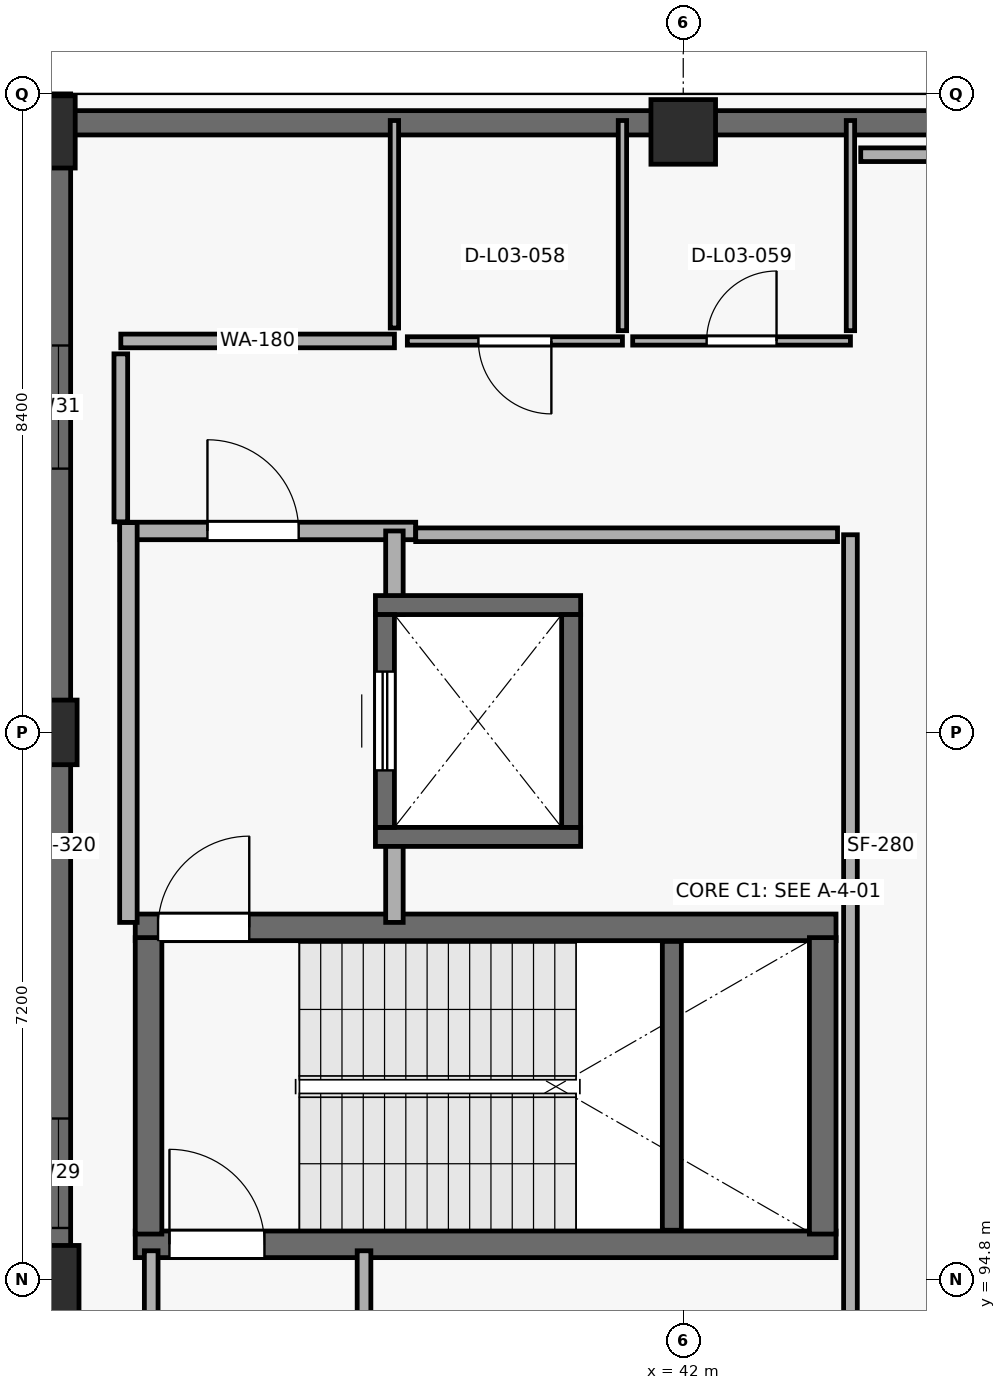
"""IFC4 building model, lengths in metres.
Left out: names, types, materials, properties, quantities, classifications, styles, units other than length and angle.
Written with IfcOpenShell. Run it as: python <this file> out.ifc"""

import sys

from ifc_helpers import new_model, si_unit, direction, frame, frame_2d, origin, origin_2d, place, context, subcontext, project, spatial, rectangle, extrude, element, fill, save


model = new_model("IFC4")
c1 = context("Model", 3, precision=1e-05, world=origin(), true_north=direction((0.0, 1.0)))
c2 = subcontext(c1, "Body", "Model", "MODEL_VIEW")
j1 = project(units=[si_unit("LENGTHUNIT", "METRE"), si_unit("PLANEANGLEUNIT", "RADIAN")], contexts=[c1])
p1 = place(None, origin())
s1 = spatial("IfcSite", under=j1, at=p1, CompositionType="ELEMENT")
p2 = place(p1, origin())
s2 = spatial("IfcBuilding", under=s1, at=p2, CompositionType="ELEMENT")
p3 = place(p2, frame((0.0, 0.0, 10.2)))
s3 = spatial("IfcBuildingStorey", under=s2, at=p3, CompositionType="ELEMENT", Elevation=10.2)
p4 = place(p3, frame((33.6, 94.8, 0.0), z_axis=(0.0, 0.0, 1.0), x_axis=(1.0, 0.0, 0.0)))
e1 = element("IfcColumn", 1, at=p4, inside=s3, PredefinedType="COLUMN", context=c2, shape_type="SweptSolid", body=[
    extrude(rectangle(XDim=0.9, YDim=0.9, at=origin_2d()), origin(), (0.0, 0.0, 1.0), 5.1),
])
p5 = place(p3, frame((33.6, 102.0, 0.0), z_axis=(0.0, 0.0, 1.0), x_axis=(1.0, 0.0, 0.0)))
e2 = element("IfcColumn", 2, at=p5, inside=s3, PredefinedType="COLUMN", context=c2, shape_type="SweptSolid", body=[
    extrude(rectangle(XDim=0.85, YDim=0.85, at=origin_2d()), origin(), (0.0, 0.0, 1.0), 5.1),
])
p6 = place(p3, frame((33.6, 109.9, 0.0), z_axis=(0.0, 0.0, 1.0), x_axis=(1.0, 0.0, 0.0)))
e3 = element("IfcColumn", 3, at=p6, inside=s3, PredefinedType="COLUMN", context=c2, shape_type="SweptSolid", body=[
    extrude(rectangle(XDim=0.8, YDim=0.95, at=origin_2d()), origin(), (0.0, 0.0, 1.0), 5.1),
])
p7 = place(p3, frame((42.0, 109.9, 0.0), z_axis=(0.0, 0.0, 1.0), x_axis=(1.0, 0.0, 0.0)))
e4 = element("IfcColumn", 4, at=p7, inside=s3, PredefinedType="COLUMN", context=c2, shape_type="SweptSolid", body=[
    extrude(rectangle(XDim=0.85, YDim=0.85, at=origin_2d()), origin(), (0.0, 0.0, 1.0), 5.1),
])
p8 = place(p3, frame((33.78, 90.6, 0.0), z_axis=(0.0, 0.0, 1.0), x_axis=(0.0, 1.0, 0.0)))
e5 = element("IfcWall", 5, at=p8, inside=s3, PredefinedType="SOLIDWALL", context=c2, shape_type="SweptSolid", body=[
    extrude(rectangle(XDim=19.8, YDim=0.32, at=frame_2d((9.9, 0.0))), origin(), (0.0, 0.0, 1.0), 4.82),
])
p9 = place(p8, frame((4.88, 0.0, 0.75)))
e6 = element("IfcOpeningElement", 6, at=p9, cuts=e5, PredefinedType="OPENING", context=c2, shape_type="SweptSolid", body=[
    extrude(rectangle(XDim=1.44, YDim=3.05, at=frame_2d((0.72, 1.525))), frame((0.0, 0.17, 0.0), z_axis=(0.0, -1.0, 0.0), x_axis=(1.0, 0.0, 0.0)), (0.0, 0.0, 1.0), 0.34),
])
p10 = place(p8, frame((14.87, 0.0, 0.75)))
e7 = element("IfcOpeningElement", 7, at=p10, cuts=e5, PredefinedType="OPENING", context=c2, shape_type="SweptSolid", body=[
    extrude(rectangle(XDim=1.62, YDim=1.85, at=frame_2d((0.81, 0.925))), frame((0.0, 0.17, 0.0), z_axis=(0.0, -1.0, 0.0), x_axis=(1.0, 0.0, 0.0)), (0.0, 0.0, 1.0), 0.34),
])
p11 = place(p3, frame((33.6, 110.02, 0.0), z_axis=(0.0, 0.0, 1.0), x_axis=(1.0, 0.0, 0.0)))
e8 = element("IfcWall", 8, at=p11, inside=s3, PredefinedType="SOLIDWALL", context=c2, shape_type="SweptSolid", body=[
    extrude(rectangle(XDim=33.6, YDim=0.32, at=frame_2d((16.8, 0.0))), origin(), (0.0, 0.0, 1.0), 4.82),
])
p12 = place(p3, frame((34.79, 95.265, 0.0), z_axis=(0.0, 0.0, 1.0), x_axis=(1.0, 0.0, 0.0)))
e9 = element("IfcWall", 9, at=p12, inside=s3, PredefinedType="SHEAR", context=c2, shape_type="SweptSolid", body=[
    extrude(rectangle(XDim=9.22, YDim=0.35, at=frame_2d((4.61, 0.0))), origin(), (0.0, 0.0, 1.0), 4.82),
])
p13 = place(p12, frame((0.45, 0.0, 0.0)))
e10 = element("IfcOpeningElement", 10, at=p13, cuts=e9, PredefinedType="OPENING", context=c2, shape_type="SweptSolid", body=[
    extrude(rectangle(XDim=1.25, YDim=2.2, at=frame_2d((0.625, 1.1))), frame((0.0, 0.185, 0.0), z_axis=(0.0, -1.0, 0.0), x_axis=(1.0, 0.0, 0.0)), (0.0, 0.0, 1.0), 0.37),
])
p14 = place(p3, frame((44.01, 99.435, 0.0), z_axis=(0.0, 0.0, 1.0), x_axis=(-1.0, 0.0, 0.0)))
e11 = element("IfcWall", 11, at=p14, inside=s3, PredefinedType="SHEAR", context=c2, shape_type="SweptSolid", body=[
    extrude(rectangle(XDim=9.22, YDim=0.35, at=frame_2d((4.61, 0.0))), origin(), (0.0, 0.0, 1.0), 4.82),
])
p15 = place(p14, frame((7.72, 0.0, 0.0)))
e12 = element("IfcOpeningElement", 12, at=p15, cuts=e11, PredefinedType="OPENING", context=c2, shape_type="SweptSolid", body=[
    extrude(rectangle(XDim=1.2, YDim=2.2, at=frame_2d((0.6, 1.1))), frame((0.0, 0.185, 0.0), z_axis=(0.0, -1.0, 0.0), x_axis=(1.0, 0.0, 0.0)), (0.0, 0.0, 1.0), 0.37),
])
for number, where, z_axis, x_axis in (
    (13, (34.965, 95.4, 0.0), (0.0, 0.0, 1.0), (0.0, 1.0, 0.0)),
    (14, (43.835, 99.3, 0.0), (0.0, 0.0, 1.0), (0.0, -1.0, 0.0)),
):
    element("IfcWall", number, at=place(p3, frame(where, z_axis=z_axis, x_axis=x_axis)), inside=s3, PredefinedType="SHEAR", context=c2, shape_type="SweptSolid", body=[
        extrude(rectangle(XDim=3.9, YDim=0.35, at=frame_2d((1.95, 0.0))), origin(), (0.0, 0.0, 1.0), 4.82),
    ])
p16 = place(p3, frame((41.85, 95.45, 0.0), z_axis=(0.0, 0.0, 1.0), x_axis=(0.0, 1.0, 0.0)))
e15 = element("IfcWall", 15, at=p16, inside=s3, PredefinedType="SHEAR", context=c2, shape_type="SweptSolid", body=[
    extrude(rectangle(XDim=3.8, YDim=0.25, at=frame_2d((1.9, 0.0))), origin(), (0.0, 0.0, 1.0), 2.37),
])
p17 = place(p3, frame((34.59, 104.65, 0.0), z_axis=(0.0, 0.0, 1.0), x_axis=(1.0, 0.0, 0.0)))
e16 = element("IfcWall", 16, at=p17, inside=s3, PredefinedType="PARTITIONING", context=c2, shape_type="SweptSolid", body=[
    extrude(rectangle(XDim=3.89, YDim=0.23, at=frame_2d((1.945, 0.0))), origin(), (0.0, 0.0, 1.0), 4.82),
])
p18 = place(p17, frame((1.15, 0.0, 0.0)))
e17 = element("IfcOpeningElement", 17, at=p18, cuts=e16, PredefinedType="OPENING", context=c2, shape_type="SweptSolid", body=[
    extrude(rectangle(XDim=1.2, YDim=2.2, at=frame_2d((0.6, 1.1))), frame((0.0, 0.125, 0.0), z_axis=(0.0, -1.0, 0.0), x_axis=(1.0, 0.0, 0.0)), (0.0, 0.0, 1.0), 0.25),
])
p19 = place(p3, frame((34.7, 99.5, 0.0), z_axis=(0.0, 0.0, 1.0), x_axis=(0.0, 1.0, 0.0)))
e18 = element("IfcWall", 18, at=p19, inside=s3, PredefinedType="PARTITIONING", context=c2, shape_type="SweptSolid", body=[
    extrude(rectangle(XDim=5.26, YDim=0.23, at=frame_2d((2.63, 0.0))), origin(), (0.0, 0.0, 1.0), 4.82),
])
p20 = place(p3, frame((38.2, 104.65, 0.0), z_axis=(0.0, 0.0, 1.0), x_axis=(0.0, -1.0, 0.0)))
e19 = element("IfcWall", 19, at=p20, inside=s3, PredefinedType="PARTITIONING", context=c2, shape_type="SweptSolid", body=[
    extrude(rectangle(XDim=1.1, YDim=0.23, at=frame_2d((0.55, 0.0))), origin(), (0.0, 0.0, 1.0), 4.82),
])
p21 = place(p3, frame((38.2, 100.75, 0.0), z_axis=(0.0, 0.0, 1.0), x_axis=(0.0, -1.0, 0.0)))
e20 = element("IfcWall", 20, at=p21, inside=s3, PredefinedType="PARTITIONING", context=c2, shape_type="SweptSolid", body=[
    extrude(rectangle(XDim=1.25, YDim=0.23, at=frame_2d((0.625, 0.0))), origin(), (0.0, 0.0, 1.0), 4.82),
])
for number, where, z_axis, x_axis in (
    (21, (37.95, 100.625, 0.0), (0.0, 0.0, 1.0), (1.0, 0.0, 0.0)),
    (22, (40.65, 103.675, 0.0), (0.0, 0.0, 1.0), (-1.0, 0.0, 0.0)),
):
    element("IfcWall", number, at=place(p3, frame(where, z_axis=z_axis, x_axis=x_axis)), inside=s3, PredefinedType="SHEAR", context=c2, shape_type="SweptSolid", body=[
        extrude(rectangle(XDim=2.7, YDim=0.25, at=frame_2d((1.35, 0.0))), origin(), (0.0, 0.0, 1.0), 4.82),
    ])
p22 = place(p3, frame((38.075, 100.75, 0.0), z_axis=(0.0, 0.0, 1.0), x_axis=(0.0, 1.0, 0.0)))
e23 = element("IfcWall", 23, at=p22, inside=s3, PredefinedType="SHEAR", context=c2, shape_type="SweptSolid", body=[
    extrude(rectangle(XDim=2.8, YDim=0.25, at=frame_2d((1.4, 0.0))), origin(), (0.0, 0.0, 1.0), 4.82),
])
p23 = place(p22, frame((0.75, 0.0, 0.0)))
e24 = element("IfcOpeningElement", 24, at=p23, cuts=e23, PredefinedType="OPENING", context=c2, shape_type="SweptSolid", body=[
    extrude(rectangle(XDim=1.3, YDim=2.25, at=frame_2d((0.65, 1.125))), frame((0.0, 0.135, 0.0), z_axis=(0.0, -1.0, 0.0), x_axis=(1.0, 0.0, 0.0)), (0.0, 0.0, 1.0), 0.27),
])
p24 = place(p3, frame((40.525, 103.55, 0.0), z_axis=(0.0, 0.0, 1.0), x_axis=(0.0, -1.0, 0.0)))
e25 = element("IfcWall", 25, at=p24, inside=s3, PredefinedType="SHEAR", context=c2, shape_type="SweptSolid", body=[
    extrude(rectangle(XDim=2.8, YDim=0.25, at=frame_2d((1.4, 0.0))), origin(), (0.0, 0.0, 1.0), 4.82),
])
p25 = place(p3, frame((44.2, 104.6, 0.0), z_axis=(0.0, 0.0, 1.0), x_axis=(0.0, -1.0, 0.0)))
e26 = element("IfcWall", 26, at=p25, inside=s3, PredefinedType="PARTITIONING", context=c2, shape_type="SweptSolid", body=[
    extrude(rectangle(XDim=10.75, YDim=0.18, at=frame_2d((5.375, 0.0))), origin(), (0.0, 0.0, 1.0), 4.82),
])
p26 = place(p3, frame((38.48, 104.6, 0.0), z_axis=(0.0, 0.0, 1.0), x_axis=(1.0, 0.0, 0.0)))
e27 = element("IfcWall", 27, at=p26, inside=s3, PredefinedType="PARTITIONING", context=c2, shape_type="SweptSolid", body=[
    extrude(rectangle(XDim=5.55, YDim=0.18, at=frame_2d((2.775, 0.0))), origin(), (0.0, 0.0, 1.0), 4.82),
])
p27 = place(p3, frame((38.2, 107.15, 0.0), z_axis=(0.0, 0.0, 1.0), x_axis=(-1.0, 0.0, 0.0)))
e28 = element("IfcWall", 28, at=p27, inside=s3, PredefinedType="PARTITIONING", context=c2, shape_type="SweptSolid", body=[
    extrude(rectangle(XDim=3.6, YDim=0.18, at=frame_2d((1.8, 0.0))), origin(), (0.0, 0.0, 1.0), 4.82),
])
p28 = place(p3, frame((41.2, 107.15, 0.0), z_axis=(0.0, 0.0, 1.0), x_axis=(-1.0, 0.0, 0.0)))
e29 = element("IfcWall", 29, at=p28, inside=s3, PredefinedType="PARTITIONING", context=c2, shape_type="SweptSolid", body=[
    extrude(rectangle(XDim=2.83, YDim=0.11, at=frame_2d((1.415, 0.0))), origin(), (0.0, 0.0, 1.0), 4.82),
])
p29 = place(p28, frame((0.935, 0.0, 0.0)))
e30 = element("IfcOpeningElement", 30, at=p29, cuts=e29, PredefinedType="OPENING", context=c2, shape_type="SweptSolid", body=[
    extrude(rectangle(XDim=0.96, YDim=2.14, at=frame_2d((0.48, 1.07))), frame((0.0, 0.065, 0.0), z_axis=(0.0, -1.0, 0.0), x_axis=(1.0, 0.0, 0.0)), (0.0, 0.0, 1.0), 0.13),
])
p30 = place(p3, frame((44.2, 107.15, 0.0), z_axis=(0.0, 0.0, 1.0), x_axis=(-1.0, 0.0, 0.0)))
e31 = element("IfcWall", 31, at=p30, inside=s3, PredefinedType="PARTITIONING", context=c2, shape_type="SweptSolid", body=[
    extrude(rectangle(XDim=2.865, YDim=0.11, at=frame_2d((1.433, 0.0))), origin(), (0.0, 0.0, 1.0), 4.82),
])
p31 = place(p30, frame((0.972, 0.0, 0.0)))
e32 = element("IfcOpeningElement", 32, at=p31, cuts=e31, PredefinedType="OPENING", context=c2, shape_type="SweptSolid", body=[
    extrude(rectangle(XDim=0.92, YDim=2.12, at=frame_2d((0.46, 1.06))), frame((0.0, 0.065, 0.0), z_axis=(0.0, -1.0, 0.0), x_axis=(1.0, 0.0, 0.0)), (0.0, 0.0, 1.0), 0.13),
])
p32 = place(p3, frame((41.2, 110.05, 0.0), z_axis=(0.0, 0.0, 1.0), x_axis=(0.0, -1.0, 0.0)))
e33 = element("IfcWall", 33, at=p32, inside=s3, PredefinedType="PARTITIONING", context=c2, shape_type="SweptSolid", body=[
    extrude(rectangle(XDim=2.765, YDim=0.11, at=frame_2d((1.383, 0.0))), origin(), (0.0, 0.0, 1.0), 4.82),
])
p33 = place(p3, frame((38.2, 107.32, 0.0), z_axis=(0.0, 0.0, 1.0), x_axis=(0.0, 1.0, 0.0)))
e34 = element("IfcWall", 34, at=p33, inside=s3, PredefinedType="PARTITIONING", context=c2, shape_type="SweptSolid", body=[
    extrude(rectangle(XDim=2.73, YDim=0.11, at=frame_2d((1.365, 0.0))), origin(), (0.0, 0.0, 1.0), 4.82),
])
p34 = place(p3, frame((44.2, 110.05, 0.0), z_axis=(0.0, 0.0, 1.0), x_axis=(0.0, -1.0, 0.0)))
e35 = element("IfcWall", 35, at=p34, inside=s3, PredefinedType="PARTITIONING", context=c2, shape_type="SweptSolid", body=[
    extrude(rectangle(XDim=2.765, YDim=0.11, at=frame_2d((1.383, 0.0))), origin(), (0.0, 0.0, 1.0), 4.82),
])
p35 = place(p3, frame((34.6, 106.98, 0.0), z_axis=(0.0, 0.0, 1.0), x_axis=(0.0, -1.0, 0.0)))
e36 = element("IfcWall", 36, at=p35, inside=s3, PredefinedType="PARTITIONING", context=c2, shape_type="SweptSolid", body=[
    extrude(rectangle(XDim=2.21, YDim=0.18, at=frame_2d((1.105, 0.0))), origin(), (0.0, 0.0, 1.0), 4.82),
])
p36 = place(p3, frame((46.23, 109.6, 0.0), z_axis=(0.0, 0.0, 1.0), x_axis=(-1.0, 0.0, 0.0)))
e37 = element("IfcWall", 37, at=p36, inside=s3, PredefinedType="PARTITIONING", context=c2, shape_type="SweptSolid", body=[
    extrude(rectangle(XDim=1.895, YDim=0.18, at=frame_2d((0.948, 0.0))), origin(), (0.0, 0.0, 1.0), 3.9),
])
p37 = place(p3, frame((37.8, 94.02, 0.0), z_axis=(0.0, 0.0, 1.0), x_axis=(0.0, 1.0, 0.0)))
e38 = element("IfcWall", 38, at=p37, inside=s3, PredefinedType="PARTITIONING", context=c2, shape_type="SweptSolid", body=[
    extrude(rectangle(XDim=1.16, YDim=0.18, at=frame_2d((0.58, 0.0))), origin(), (0.0, 0.0, 1.0), 4.82),
])
p38 = place(p3, frame((35.0, 95.18, 0.0), z_axis=(0.0, 0.0, 1.0), x_axis=(0.0, -1.0, 0.0)))
e39 = element("IfcWall", 39, at=p38, inside=s3, PredefinedType="PARTITIONING", context=c2, shape_type="SweptSolid", body=[
    extrude(rectangle(XDim=1.33, YDim=0.18, at=frame_2d((0.665, 0.0))), origin(), (0.0, 0.0, 1.0), 4.82),
])
p39 = place(p9, origin())
e40 = element("IfcWindow", 40, at=p39, inside=s3, PartitioningType="SINGLE_PANEL", PredefinedType="WINDOW", context=c2, shape_type="SweptSolid", body=[
    extrude(rectangle(XDim=1.44, YDim=3.05, at=frame_2d((0.72, 1.525))), frame((0.0, 0.03, 0.0), z_axis=(0.0, -1.0, 0.0), x_axis=(1.0, 0.0, 0.0)), (0.0, 0.0, 1.0), 0.06),
])
fill(e6, e40)
p40 = place(p10, origin())
e41 = element("IfcWindow", 41, at=p40, inside=s3, PartitioningType="SINGLE_PANEL", PredefinedType="WINDOW", context=c2, shape_type="SweptSolid", body=[
    extrude(rectangle(XDim=1.62, YDim=1.85, at=frame_2d((0.81, 0.925))), frame((0.0, 0.03, 0.0), z_axis=(0.0, -1.0, 0.0), x_axis=(1.0, 0.0, 0.0)), (0.0, 0.0, 1.0), 0.06),
])
fill(e7, e41)
p41 = place(p13, origin())
e42 = element("IfcDoor", 42, at=p41, inside=s3, OperationType="SINGLE_SWING_LEFT", PredefinedType="DOOR", context=c2, shape_type="SweptSolid", body=[
    extrude(rectangle(XDim=1.25, YDim=2.2, at=frame_2d((0.625, 1.1))), frame((0.0, 0.025, 0.0), z_axis=(0.0, -1.0, 0.0), x_axis=(1.0, 0.0, 0.0)), (0.0, 0.0, 1.0), 0.05),
])
fill(e10, e42)
p42 = place(p15, origin())
e43 = element("IfcDoor", 43, at=p42, inside=s3, OperationType="SINGLE_SWING_RIGHT", PredefinedType="DOOR", context=c2, shape_type="SweptSolid", body=[
    extrude(rectangle(XDim=1.2, YDim=2.2, at=frame_2d((0.6, 1.1))), frame((0.0, 0.025, 0.0), z_axis=(0.0, -1.0, 0.0), x_axis=(1.0, 0.0, 0.0)), (0.0, 0.0, 1.0), 0.05),
])
fill(e12, e43)
p43 = place(p18, origin())
e44 = element("IfcDoor", 44, at=p43, inside=s3, OperationType="SINGLE_SWING_LEFT", PredefinedType="DOOR", context=c2, shape_type="SweptSolid", body=[
    extrude(rectangle(XDim=1.2, YDim=2.2, at=frame_2d((0.6, 1.1))), frame((0.0, 0.025, 0.0), z_axis=(0.0, -1.0, 0.0), x_axis=(1.0, 0.0, 0.0)), (0.0, 0.0, 1.0), 0.05),
])
fill(e17, e44)
p44 = place(p23, origin())
e45 = element("IfcDoor", 45, at=p44, inside=s3, OperationType="SLIDING_TO_RIGHT", PredefinedType="DOOR", context=c2, shape_type="SweptSolid", body=[
    extrude(rectangle(XDim=1.3, YDim=2.25, at=frame_2d((0.65, 1.125))), frame((0.0, 0.025, 0.0), z_axis=(0.0, -1.0, 0.0), x_axis=(1.0, 0.0, 0.0)), (0.0, 0.0, 1.0), 0.05),
])
fill(e24, e45)
p45 = place(p29, origin())
e46 = element("IfcDoor", 46, at=p45, inside=s3, OperationType="SINGLE_SWING_LEFT", PredefinedType="DOOR", context=c2, shape_type="SweptSolid", body=[
    extrude(rectangle(XDim=0.96, YDim=2.14, at=frame_2d((0.48, 1.07))), frame((0.0, 0.025, 0.0), z_axis=(0.0, -1.0, 0.0), x_axis=(1.0, 0.0, 0.0)), (0.0, 0.0, 1.0), 0.05),
])
fill(e30, e46)
p46 = place(p31, origin())
e47 = element("IfcDoor", 47, at=p46, inside=s3, OperationType="SINGLE_SWING_RIGHT", PredefinedType="DOOR", context=c2, shape_type="SweptSolid", body=[
    extrude(rectangle(XDim=0.92, YDim=2.12, at=frame_2d((0.46, 1.06))), frame((0.0, 0.025, 0.0), z_axis=(0.0, -1.0, 0.0), x_axis=(1.0, 0.0, 0.0)), (0.0, 0.0, 1.0), 0.05),
])
fill(e32, e47)
save(model, sys.argv[1])
